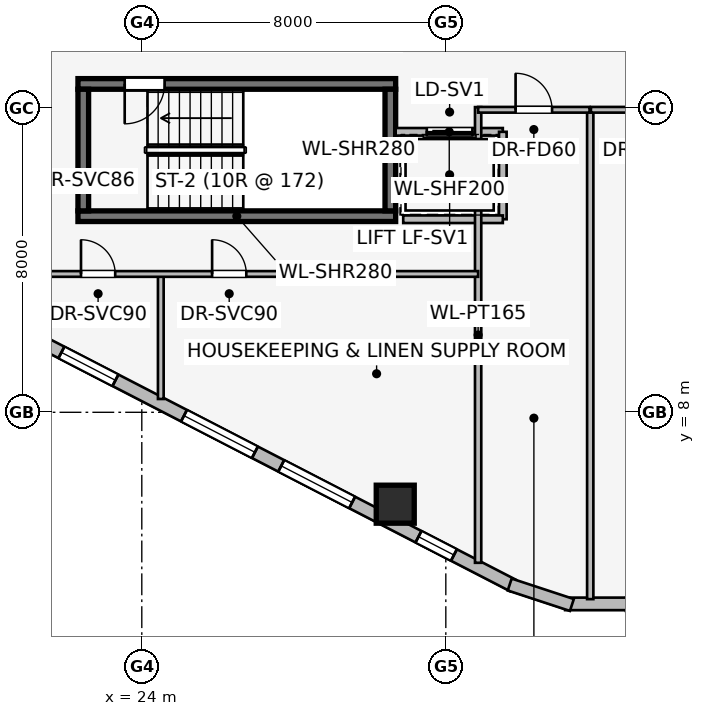
"""IFC4 building model, lengths in metres.
Left out: names, types, materials, properties, quantities, classifications, styles, units other than length and angle.
Written with IfcOpenShell. Run it as: python <this file> out.ifc"""

import sys

from ifc_helpers import new_model, si_unit, direction, frame, frame_2d, origin, origin_2d, place, context, subcontext, project, spatial, rectangle, extrude, element, fill, save


model = new_model("IFC4")
c1 = context("Model", 3, precision=1e-05, world=origin(), true_north=direction((0.0, 1.0)))
c2 = subcontext(c1, "Body", "Model", "MODEL_VIEW")
j1 = project(units=[si_unit("LENGTHUNIT", "METRE"), si_unit("PLANEANGLEUNIT", "RADIAN")], contexts=[c1])
p1 = place(None, origin())
s1 = spatial("IfcSite", under=j1, at=p1, CompositionType="ELEMENT")
p2 = place(p1, origin())
s2 = spatial("IfcBuilding", under=s1, at=p2, CompositionType="ELEMENT")
p3 = place(p2, frame((0.0, 0.0, 139.5)))
s3 = spatial("IfcBuildingStorey", under=s2, at=p3, CompositionType="ELEMENT", Elevation=139.5)
p4 = place(p3, frame((22.32, 13.16, 0.0), z_axis=(0.0, 0.0, 1.0), x_axis=(1.0, 0.0, 0.0)))
e1 = element("IfcWall", 1, at=p4, inside=s3, PredefinedType="SHEAR", context=c2, shape_type="SweptSolid", body=[
    extrude(rectangle(XDim=8.36, YDim=0.28, at=frame_2d((4.18, 0.0))), origin(), (0.0, 0.0, 1.0), 3.45),
])
p5 = place(p3, frame((30.68, 16.64, 0.0), z_axis=(0.0, 0.0, 1.0), x_axis=(-1.0, 0.0, 0.0)))
e2 = element("IfcWall", 2, at=p5, inside=s3, PredefinedType="SHEAR", context=c2, shape_type="SweptSolid", body=[
    extrude(rectangle(XDim=8.36, YDim=0.28, at=frame_2d((4.18, 0.0))), origin(), (0.0, 0.0, 1.0), 3.45),
])
p6 = place(p5, frame((6.08, 0.0, 0.0)))
e3 = element("IfcOpeningElement", 3, at=p6, cuts=e2, PredefinedType="OPENING", context=c2, shape_type="SweptSolid", body=[
    extrude(rectangle(XDim=1.05, YDim=2.0, at=frame_2d((0.525, 1.0))), frame((0.0, 0.15, 0.0), z_axis=(0.0, -1.0, 0.0), x_axis=(1.0, 0.0, 0.0)), (0.0, 0.0, 1.0), 0.3),
])
for number, where, z_axis, x_axis in (
    (4, (22.46, 16.5, 0.0), (0.0, 0.0, 1.0), (0.0, -1.0, 0.0)),
    (5, (30.54, 13.3, 0.0), (0.0, 0.0, 1.0), (0.0, 1.0, 0.0)),
):
    element("IfcWall", number, at=place(p3, frame(where, z_axis=z_axis, x_axis=x_axis)), inside=s3, PredefinedType="SHEAR", context=c2, shape_type="SweptSolid", body=[
        extrude(rectangle(XDim=3.2, YDim=0.28, at=frame_2d((1.6, 0.0))), origin(), (0.0, 0.0, 1.0), 3.45),
    ])
p7 = place(p3, frame((30.669, 5.582, 0.0), z_axis=(0.0, 0.0, 1.0), x_axis=(1.0, 0.0, 0.0)))
e6 = element("IfcColumn", 6, at=p7, inside=s3, PredefinedType="COLUMN", context=c2, shape_type="SweptSolid", body=[
    extrude(rectangle(XDim=1.0, YDim=1.0, at=origin_2d()), origin(), (0.0, 0.0, 1.0), 3.45),
])
p8 = place(p3, frame((33.769, 3.442, 0.0), z_axis=(0.0, 0.0, 1.0), x_axis=(-0.888613612362, 0.458656568606, 0.0)))
e7 = element("IfcWall", 7, at=p8, inside=s3, PredefinedType="STANDARD", context=c2, shape_type="SweptSolid", body=[
    extrude(rectangle(XDim=18.681, YDim=0.34, at=frame_2d((9.34, 0.0))), origin(), (0.0, 0.0, 1.0), 3.16),
])
p9 = place(p8, frame((1.75, 0.0, 0.75)))
e8 = element("IfcOpeningElement", 8, at=p9, cuts=e7, PredefinedType="OPENING", context=c2, shape_type="SweptSolid", body=[
    extrude(rectangle(XDim=1.05, YDim=1.4, at=frame_2d((0.525, 0.7))), frame((0.0, 0.18, 0.0), z_axis=(0.0, -1.0, 0.0), x_axis=(1.0, 0.0, 0.0)), (0.0, 0.0, 1.0), 0.36),
])
p10 = place(p8, frame((4.765, 0.0, 0.75)))
e9 = element("IfcOpeningElement", 9, at=p10, cuts=e7, PredefinedType="OPENING", context=c2, shape_type="SweptSolid", body=[
    extrude(rectangle(XDim=2.1, YDim=1.5, at=frame_2d((1.05, 0.75))), frame((0.0, 0.18, 0.0), z_axis=(0.0, -1.0, 0.0), x_axis=(1.0, 0.0, 0.0)), (0.0, 0.0, 1.0), 0.36),
])
p11 = place(p8, frame((7.644, 0.0, 0.75)))
e10 = element("IfcOpeningElement", 10, at=p11, cuts=e7, PredefinedType="OPENING", context=c2, shape_type="SweptSolid", body=[
    extrude(rectangle(XDim=2.1, YDim=1.5, at=frame_2d((1.05, 0.75))), frame((0.0, 0.18, 0.0), z_axis=(0.0, -1.0, 0.0), x_axis=(1.0, 0.0, 0.0)), (0.0, 0.0, 1.0), 0.36),
])
p12 = place(p8, frame((11.774, 0.0, 0.75)))
e11 = element("IfcOpeningElement", 11, at=p12, cuts=e7, PredefinedType="OPENING", context=c2, shape_type="SweptSolid", body=[
    extrude(rectangle(XDim=1.6, YDim=1.55, at=frame_2d((0.8, 0.775))), frame((0.0, 0.18, 0.0), z_axis=(0.0, -1.0, 0.0), x_axis=(1.0, 0.0, 0.0)), (0.0, 0.0, 1.0), 0.36),
])
p13 = place(p8, frame((15.92, 0.0, 0.75)))
e12 = element("IfcOpeningElement", 12, at=p13, cuts=e7, PredefinedType="OPENING", context=c2, shape_type="SweptSolid", body=[
    extrude(rectangle(XDim=1.05, YDim=1.4, at=frame_2d((0.525, 0.7))), frame((0.0, 0.18, 0.0), z_axis=(0.0, -1.0, 0.0), x_axis=(1.0, 0.0, 0.0)), (0.0, 0.0, 1.0), 0.36),
])
for number, where, z_axis, x_axis in (
    (13, (38.319, 3.468, 0.0), (0.0, 0.0, 1.0), (-0.95, -0.312, 0.0)),
    (14, (36.861, 2.959, 0.0), (0.0, 0.0, 1.0), (-1.0, 0.0, 0.0)),
    (15, (35.317, 2.93, 0.0), (0.0, 0.0, 1.0), (-0.95, 0.312, 0.0)),
):
    element("IfcWall", number, at=place(p3, frame(where, z_axis=z_axis, x_axis=x_axis)), inside=s3, PredefinedType="STANDARD", context=c2, shape_type="SweptSolid", body=[
        extrude(rectangle(XDim=1.722, YDim=0.33, at=frame_2d((0.861, 0.0))), origin(), (0.0, 0.0, 1.0), 3.16),
    ])
p14 = place(p3, frame((33.5, 15.38, 0.0), z_axis=(0.0, 0.0, 1.0), x_axis=(-1.0, 0.0, 0.0)))
e16 = element("IfcWall", 16, at=p14, inside=s3, PredefinedType="PARTITIONING", context=c2, shape_type="SweptSolid", body=[
    extrude(rectangle(XDim=2.82, YDim=0.2, at=frame_2d((1.41, 0.0))), origin(), (0.0, 0.0, 1.0), 3.16),
])
p15 = place(p14, frame((0.8, 0.0, 0.0)))
e17 = element("IfcOpeningElement", 17, at=p15, cuts=e16, PredefinedType="OPENING", context=c2, shape_type="SweptSolid", body=[
    extrude(rectangle(XDim=1.2, YDim=2.2, at=frame_2d((0.6, 1.1))), frame((0.0, 0.11, 0.0), z_axis=(0.0, -1.0, 0.0), x_axis=(1.0, 0.0, 0.0)), (0.0, 0.0, 1.0), 0.22),
])
p16 = place(p3, frame((33.5, 13.08, 0.0), z_axis=(0.0, 0.0, 1.0), x_axis=(0.0, 1.0, 0.0)))
e18 = element("IfcWall", 18, at=p16, inside=s3, PredefinedType="PARTITIONING", context=c2, shape_type="SweptSolid", body=[
    extrude(rectangle(XDim=2.3, YDim=0.2, at=frame_2d((1.15, 0.0))), origin(), (0.0, 0.0, 1.0), 3.16),
])
p17 = place(p3, frame((30.879, 13.08, 0.0), z_axis=(0.0, 0.0, 1.0), x_axis=(1.0, 0.0, 0.0)))
e19 = element("IfcWall", 19, at=p17, inside=s3, PredefinedType="PARTITIONING", context=c2, shape_type="SweptSolid", body=[
    extrude(rectangle(XDim=2.621, YDim=0.2, at=frame_2d((1.311, 0.0))), origin(), (0.0, 0.0, 1.0), 3.16),
])
p18 = place(p3, frame((32.85, 4.04, 0.0), z_axis=(0.0, 0.0, 1.0), x_axis=(0.0, 1.0, 0.0)))
e20 = element("IfcWall", 20, at=p18, inside=s3, PredefinedType="PARTITIONING", context=c2, shape_type="SweptSolid", body=[
    extrude(rectangle(XDim=11.99, YDim=0.165, at=frame_2d((5.995, 0.0))), origin(), (0.0, 0.0, 1.0), 3.16),
])
p19 = place(p3, frame((24.5, 8.35, 0.0), z_axis=(0.0, 0.0, 1.0), x_axis=(0.0, 1.0, 0.0)))
e21 = element("IfcWall", 21, at=p19, inside=s3, PredefinedType="PARTITIONING", context=c2, shape_type="SweptSolid", body=[
    extrude(rectangle(XDim=3.29, YDim=0.15, at=frame_2d((1.645, 0.0))), origin(), (0.0, 0.0, 1.0), 3.16),
])
p20 = place(p3, frame((18.126, 11.64, 0.0), z_axis=(0.0, 0.0, 1.0), x_axis=(1.0, 0.0, 0.0)))
e22 = element("IfcWall", 22, at=p20, inside=s3, PredefinedType="PARTITIONING", context=c2, shape_type="SweptSolid", body=[
    extrude(rectangle(XDim=14.724, YDim=0.15, at=frame_2d((7.362, 0.0))), origin(), (0.0, 0.0, 1.0), 3.16),
])
p21 = place(p20, frame((4.274, 0.0, 0.0)))
e23 = element("IfcOpeningElement", 23, at=p21, cuts=e22, PredefinedType="OPENING", context=c2, shape_type="SweptSolid", body=[
    extrude(rectangle(XDim=0.9, YDim=2.0, at=frame_2d((0.45, 1.0))), frame((0.0, 0.085, 0.0), z_axis=(0.0, -1.0, 0.0), x_axis=(1.0, 0.0, 0.0)), (0.0, 0.0, 1.0), 0.17),
])
p22 = place(p20, frame((7.724, 0.0, 0.0)))
e24 = element("IfcOpeningElement", 24, at=p22, cuts=e22, PredefinedType="OPENING", context=c2, shape_type="SweptSolid", body=[
    extrude(rectangle(XDim=0.9, YDim=2.0, at=frame_2d((0.45, 1.0))), frame((0.0, 0.085, 0.0), z_axis=(0.0, -1.0, 0.0), x_axis=(1.0, 0.0, 0.0)), (0.0, 0.0, 1.0), 0.17),
])
p23 = place(p3, frame((35.8, 3.084, 0.0), z_axis=(0.0, 0.0, 1.0), x_axis=(0.0, 1.0, 0.0)))
e25 = element("IfcWall", 25, at=p23, inside=s3, PredefinedType="PARTITIONING", context=c2, shape_type="SweptSolid", body=[
    extrude(rectangle(XDim=12.846, YDim=0.165, at=frame_2d((6.423, 0.0))), origin(), (0.0, 0.0, 1.0), 3.16),
])
p24 = place(p3, frame((32.85, 15.96, 0.0), z_axis=(0.0, 0.0, 1.0), x_axis=(1.0, 0.0, 0.0)))
e26 = element("IfcWall", 26, at=p24, inside=s3, PredefinedType="PARTITIONING", context=c2, shape_type="SweptSolid", body=[
    extrude(rectangle(XDim=2.932, YDim=0.15, at=frame_2d((1.466, 0.0))), origin(), (0.0, 0.0, 1.0), 3.16),
])
p25 = place(p24, frame((0.986, 0.0, 0.0)))
e27 = element("IfcOpeningElement", 27, at=p25, cuts=e26, PredefinedType="OPENING", context=c2, shape_type="SweptSolid", body=[
    extrude(rectangle(XDim=0.96, YDim=2.0, at=frame_2d((0.48, 1.0))), frame((0.0, 0.085, 0.0), z_axis=(0.0, -1.0, 0.0), x_axis=(1.0, 0.0, 0.0)), (0.0, 0.0, 1.0), 0.17),
])
p26 = place(p3, frame((35.818, 15.96, 0.0), z_axis=(0.0, 0.0, 1.0), x_axis=(1.0, 0.0, 0.0)))
e28 = element("IfcWall", 28, at=p26, inside=s3, PredefinedType="PARTITIONING", context=c2, shape_type="SweptSolid", body=[
    extrude(rectangle(XDim=2.844, YDim=0.15, at=frame_2d((1.422, 0.0))), origin(), (0.0, 0.0, 1.0), 3.16),
])
p27 = place(p26, frame((0.942, 0.0, 0.0)))
e29 = element("IfcOpeningElement", 29, at=p27, cuts=e28, PredefinedType="OPENING", context=c2, shape_type="SweptSolid", body=[
    extrude(rectangle(XDim=0.96, YDim=2.0, at=frame_2d((0.48, 1.0))), frame((0.0, 0.085, 0.0), z_axis=(0.0, -1.0, 0.0), x_axis=(1.0, 0.0, 0.0)), (0.0, 0.0, 1.0), 0.17),
])
p28 = place(p9, origin())
e30 = element("IfcWindow", 30, at=p28, inside=s3, PartitioningType="SINGLE_PANEL", PredefinedType="WINDOW", context=c2, shape_type="SweptSolid", body=[
    extrude(rectangle(XDim=1.05, YDim=1.4, at=frame_2d((0.525, 0.7))), frame((0.0, 0.03, 0.0), z_axis=(0.0, -1.0, 0.0), x_axis=(1.0, 0.0, 0.0)), (0.0, 0.0, 1.0), 0.06),
])
fill(e8, e30)
p29 = place(p10, origin())
e31 = element("IfcWindow", 31, at=p29, inside=s3, PartitioningType="SINGLE_PANEL", PredefinedType="WINDOW", context=c2, shape_type="SweptSolid", body=[
    extrude(rectangle(XDim=2.1, YDim=1.5, at=frame_2d((1.05, 0.75))), frame((0.0, 0.03, 0.0), z_axis=(0.0, -1.0, 0.0), x_axis=(1.0, 0.0, 0.0)), (0.0, 0.0, 1.0), 0.06),
])
fill(e9, e31)
p30 = place(p11, origin())
e32 = element("IfcWindow", 32, at=p30, inside=s3, PartitioningType="SINGLE_PANEL", PredefinedType="WINDOW", context=c2, shape_type="SweptSolid", body=[
    extrude(rectangle(XDim=2.1, YDim=1.5, at=frame_2d((1.05, 0.75))), frame((0.0, 0.03, 0.0), z_axis=(0.0, -1.0, 0.0), x_axis=(1.0, 0.0, 0.0)), (0.0, 0.0, 1.0), 0.06),
])
fill(e10, e32)
p31 = place(p12, origin())
e33 = element("IfcWindow", 33, at=p31, inside=s3, PartitioningType="SINGLE_PANEL", PredefinedType="WINDOW", context=c2, shape_type="SweptSolid", body=[
    extrude(rectangle(XDim=1.6, YDim=1.55, at=frame_2d((0.8, 0.775))), frame((0.0, 0.03, 0.0), z_axis=(0.0, -1.0, 0.0), x_axis=(1.0, 0.0, 0.0)), (0.0, 0.0, 1.0), 0.06),
])
fill(e11, e33)
p32 = place(p6, origin())
e34 = element("IfcDoor", 34, at=p32, inside=s3, OperationType="SINGLE_SWING_RIGHT", PredefinedType="DOOR", context=c2, shape_type="SweptSolid", body=[
    extrude(rectangle(XDim=1.05, YDim=2.0, at=frame_2d((0.525, 1.0))), frame((0.0, 0.025, 0.0), z_axis=(0.0, -1.0, 0.0), x_axis=(1.0, 0.0, 0.0)), (0.0, 0.0, 1.0), 0.05),
])
fill(e3, e34)
p33 = place(p15, origin())
e35 = element("IfcDoor", 35, at=p33, inside=s3, OperationType="SLIDING_TO_RIGHT", PredefinedType="DOOR", context=c2, shape_type="SweptSolid", body=[
    extrude(rectangle(XDim=1.2, YDim=2.2, at=frame_2d((0.6, 1.1))), frame((0.0, 0.025, 0.0), z_axis=(0.0, -1.0, 0.0), x_axis=(1.0, 0.0, 0.0)), (0.0, 0.0, 1.0), 0.05),
])
fill(e17, e35)
p34 = place(p21, origin())
e36 = element("IfcDoor", 36, at=p34, inside=s3, OperationType="SINGLE_SWING_LEFT", PredefinedType="DOOR", context=c2, shape_type="SweptSolid", body=[
    extrude(rectangle(XDim=0.9, YDim=2.0, at=frame_2d((0.45, 1.0))), frame((0.0, 0.025, 0.0), z_axis=(0.0, -1.0, 0.0), x_axis=(1.0, 0.0, 0.0)), (0.0, 0.0, 1.0), 0.05),
])
fill(e23, e36)
p35 = place(p22, origin())
e37 = element("IfcDoor", 37, at=p35, inside=s3, OperationType="SINGLE_SWING_LEFT", PredefinedType="DOOR", context=c2, shape_type="SweptSolid", body=[
    extrude(rectangle(XDim=0.9, YDim=2.0, at=frame_2d((0.45, 1.0))), frame((0.0, 0.025, 0.0), z_axis=(0.0, -1.0, 0.0), x_axis=(1.0, 0.0, 0.0)), (0.0, 0.0, 1.0), 0.05),
])
fill(e24, e37)
p36 = place(p25, origin())
e38 = element("IfcDoor", 38, at=p36, inside=s3, OperationType="SINGLE_SWING_LEFT", PredefinedType="DOOR", context=c2, shape_type="SweptSolid", body=[
    extrude(rectangle(XDim=0.96, YDim=2.0, at=frame_2d((0.48, 1.0))), frame((0.0, 0.025, 0.0), z_axis=(0.0, -1.0, 0.0), x_axis=(1.0, 0.0, 0.0)), (0.0, 0.0, 1.0), 0.05),
])
fill(e27, e38)
save(model, sys.argv[1])
